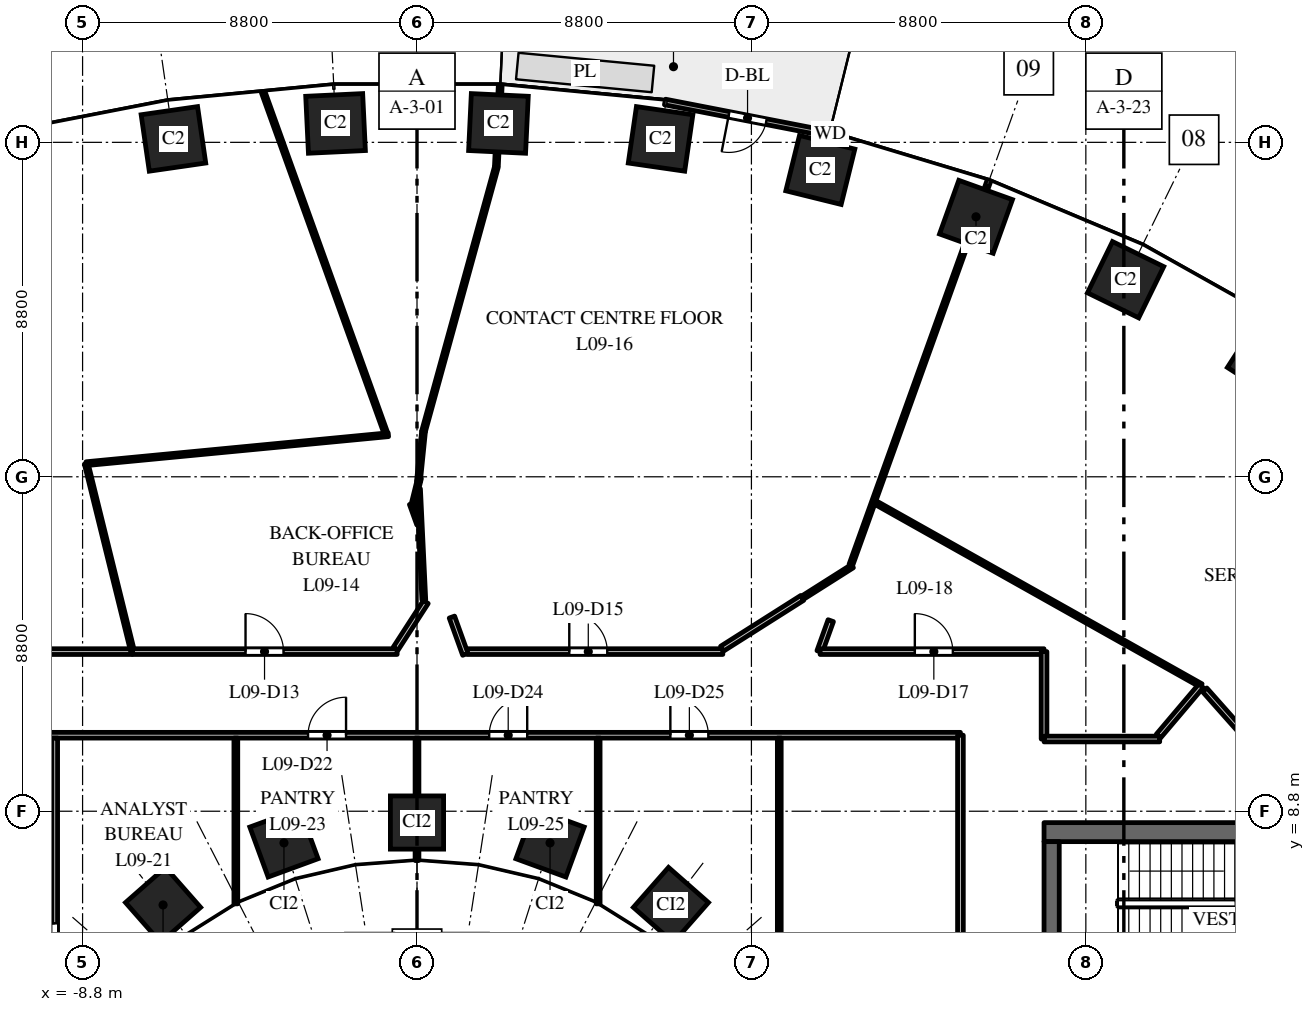
"""IFC4 building model, lengths in metres.
Left out: names, types, materials, properties, quantities, classifications, styles, units other than length and angle.
Written with IfcOpenShell. Run it as: python <this file> out.ifc"""

import sys

from ifc_helpers import new_model, si_unit, direction, frame, frame_2d, origin, origin_2d, place, context, subcontext, project, spatial, rectangle, extrude, element, fill, save


model = new_model("IFC4")
c1 = context("Model", 3, precision=1e-05, world=origin(), true_north=direction((0.0, 1.0)))
c2 = subcontext(c1, "Body", "Model", "MODEL_VIEW")
j1 = project(units=[si_unit("LENGTHUNIT", "METRE"), si_unit("PLANEANGLEUNIT", "RADIAN")], contexts=[c1])
p1 = place(None, origin())
s1 = spatial("IfcSite", under=j1, at=p1, CompositionType="ELEMENT")
p2 = place(p1, origin())
s2 = spatial("IfcBuilding", under=s1, at=p2, CompositionType="ELEMENT")
p3 = place(p2, frame((0.0, 0.0, 46.5)))
s3 = spatial("IfcBuildingStorey", under=s2, at=p3, CompositionType="ELEMENT", Elevation=46.5)
for number, where, z_axis, x_axis in (
    (1, (22.362, 20.7, 0.0), (0.0, 0.0, 1.0), (-0.84, 0.542, 0.0)),
    (2, (18.646, 22.785, 0.0), (0.0, 0.0, 1.0), (-0.898, 0.439, 0.0)),
    (3, (14.709, 24.441, 0.0), (0.0, 0.0, 1.0), (-0.941, 0.338, 0.0)),
    (4, (10.613, 25.674, 0.0), (0.0, 0.0, 1.0), (-0.971, 0.24, 0.0)),
    (5, (6.409, 26.491, 0.0), (0.0, 0.0, 1.0), (-0.99, 0.143, 0.0)),
    (6, (2.143, 26.898, 0.0), (0.0, 0.0, 1.0), (-0.999, 0.048, 0.0)),
    (7, (-2.143, 26.898, 0.0), (0.0, 0.0, 1.0), (-0.999, -0.048, 0.0)),
    (8, (-6.409, 26.491, 0.0), (0.0, 0.0, 1.0), (-0.99, -0.143, 0.0)),
):
    element("IfcColumn", number, at=place(p3, frame(where, z_axis=z_axis, x_axis=x_axis)), inside=s3, PredefinedType="COLUMN", context=c2, shape_type="SweptSolid", body=[
        extrude(rectangle(XDim=1.5, YDim=1.5, at=origin_2d()), origin(), (0.0, 0.0, 1.0), 4.0),
    ])
for number, where, z_axis, x_axis in (
    (9, (6.682, 6.334, 0.0), (0.0, 0.0, 1.0), (-0.751, 0.66, 0.0)),
    (10, (3.501, 7.967, 0.0), (0.0, 0.0, 1.0), (-0.939, 0.344, 0.0)),
    (11, (0.0, 8.503, 0.0), (0.0, 0.0, 1.0), (-1.0, 0.0, 0.0)),
    (12, (-3.501, 7.967, 0.0), (0.0, 0.0, 1.0), (-0.939, -0.344, 0.0)),
    (13, (-6.682, 6.334, 0.0), (0.0, 0.0, 1.0), (-0.751, -0.66, 0.0)),
):
    element("IfcColumn", number, at=place(p3, frame(where, z_axis=z_axis, x_axis=x_axis)), inside=s3, PredefinedType="COLUMN", context=c2, shape_type="SweptSolid", body=[
        extrude(rectangle(XDim=1.4, YDim=1.4, at=origin_2d()), origin(), (0.0, 0.0, 1.0), 4.0),
    ])
p4 = place(p3, frame((16.5, 8.25, 0.0), z_axis=(0.0, 0.0, 1.0), x_axis=(1.0, 0.0, 0.0)))
e14 = element("IfcWall", 14, at=p4, inside=s3, PredefinedType="SHEAR", context=c2, shape_type="SweptSolid", body=[
    extrude(rectangle(XDim=15.0, YDim=0.5, at=frame_2d((7.5, 0.0))), origin(), (0.0, 0.0, 1.0), 3.7),
])
p5 = place(p4, frame((6.9, 0.0, 0.0)))
e15 = element("IfcOpeningElement", 15, at=p5, cuts=e14, PredefinedType="OPENING", context=c2, shape_type="SweptSolid", body=[
    extrude(rectangle(XDim=1.2, YDim=2.1, at=frame_2d((0.6, 1.05))), frame((0.0, 0.26, 0.0), z_axis=(0.0, -1.0, 0.0), x_axis=(1.0, 0.0, 0.0)), (0.0, 0.0, 1.0), 0.52),
])
p6 = place(p4, frame((12.05, 0.0, 0.0)))
e16 = element("IfcOpeningElement", 16, at=p6, cuts=e14, PredefinedType="OPENING", context=c2, shape_type="SweptSolid", body=[
    extrude(rectangle(XDim=0.9, YDim=2.1, at=frame_2d((0.45, 1.05))), frame((0.0, 0.26, 0.0), z_axis=(0.0, -1.0, 0.0), x_axis=(1.0, 0.0, 0.0)), (0.0, 0.0, 1.0), 0.52),
])
p7 = place(p3, frame((16.7, -8.0, 0.0), z_axis=(0.0, 0.0, 1.0), x_axis=(0.0, 1.0, 0.0)))
e17 = element("IfcWall", 17, at=p7, inside=s3, PredefinedType="SHEAR", context=c2, shape_type="SweptSolid", body=[
    extrude(rectangle(XDim=16.0, YDim=0.4, at=frame_2d((8.0, 0.0))), origin(), (0.0, 0.0, 1.0), 3.7),
])
p8 = place(p3, frame((10.871, 26.617, 0.0), z_axis=(0.0, 0.0, 1.0), x_axis=(-0.981631174778, 0.190788460615, 0.0)))
e18 = element("IfcWall", 18, at=p8, inside=s3, PredefinedType="STANDARD", context=c2, shape_type="SweptSolid", body=[
    extrude(rectangle(XDim=4.426, YDim=0.15, at=frame_2d((2.213, 0.0))), origin(), (0.0, 0.0, 1.0), 3.7),
])
p9 = place(p8, frame((1.713, 0.0, 0.0)))
e19 = element("IfcOpeningElement", 19, at=p9, cuts=e18, PredefinedType="OPENING", context=c2, shape_type="SweptSolid", body=[
    extrude(rectangle(XDim=1.0, YDim=2.4, at=frame_2d((0.5, 1.2))), frame((0.0, 0.085, 0.0), z_axis=(0.0, -1.0, 0.0), x_axis=(1.0, 0.0, 0.0)), (0.0, 0.0, 1.0), 0.17),
])
p10 = place(p3, frame((-16.5, 13.0, 0.0), z_axis=(0.0, 0.0, 1.0), x_axis=(1.0, 0.0, 0.0)))
e20 = element("IfcWall", 20, at=p10, inside=s3, PredefinedType="PARTITIONING", context=c2, shape_type="SweptSolid", body=[
    extrude(rectangle(XDim=9.001, YDim=0.15, at=frame_2d((4.5, 0.0))), origin(), (0.0, 0.0, 1.0), 2.85),
])
p11 = place(p10, frame((4.117, 0.0, 0.0)))
e21 = element("IfcOpeningElement", 21, at=p11, cuts=e20, PredefinedType="OPENING", context=c2, shape_type="SweptSolid", body=[
    extrude(rectangle(XDim=1.0, YDim=2.1, at=frame_2d((0.5, 1.05))), frame((0.0, 0.085, 0.0), z_axis=(0.0, -1.0, 0.0), x_axis=(1.0, 0.0, 0.0)), (0.0, 0.0, 1.0), 0.17),
])
p12 = place(p3, frame((-14.3, 10.8, 0.0), z_axis=(0.0, 0.0, 1.0), x_axis=(1.0, 0.0, 0.0)))
e22 = element("IfcWall", 22, at=p12, inside=s3, PredefinedType="PARTITIONING", context=c2, shape_type="SweptSolid", body=[
    extrude(rectangle(XDim=28.6, YDim=0.15, at=frame_2d((14.3, 0.0))), origin(), (0.0, 0.0, 1.0), 2.85),
])
p13 = place(p12, frame((11.433, 0.0, 0.0)))
e23 = element("IfcOpeningElement", 23, at=p13, cuts=e22, PredefinedType="OPENING", context=c2, shape_type="SweptSolid", body=[
    extrude(rectangle(XDim=1.0, YDim=2.1, at=frame_2d((0.5, 1.05))), frame((0.0, 0.085, 0.0), z_axis=(0.0, -1.0, 0.0), x_axis=(1.0, 0.0, 0.0)), (0.0, 0.0, 1.0), 0.17),
])
p14 = place(p12, frame((16.2, 0.0, 0.0)))
e24 = element("IfcOpeningElement", 24, at=p14, cuts=e22, PredefinedType="OPENING", context=c2, shape_type="SweptSolid", body=[
    extrude(rectangle(XDim=1.0, YDim=2.1, at=frame_2d((0.5, 1.05))), frame((0.0, 0.085, 0.0), z_axis=(0.0, -1.0, 0.0), x_axis=(1.0, 0.0, 0.0)), (0.0, 0.0, 1.0), 0.17),
])
p15 = place(p12, frame((20.967, 0.0, 0.0)))
e25 = element("IfcOpeningElement", 25, at=p15, cuts=e22, PredefinedType="OPENING", context=c2, shape_type="SweptSolid", body=[
    extrude(rectangle(XDim=1.0, YDim=2.1, at=frame_2d((0.5, 1.05))), frame((0.0, 0.085, 0.0), z_axis=(0.0, -1.0, 0.0), x_axis=(1.0, 0.0, 0.0)), (0.0, 0.0, 1.0), 0.17),
])
p16 = place(p3, frame((-9.533, -10.725, 0.0), z_axis=(0.0, 0.0, 1.0), x_axis=(0.0, 1.0, 0.0)))
e26 = element("IfcWall", 26, at=p16, inside=s3, PredefinedType="PARTITIONING", context=c2, shape_type="SweptSolid", body=[
    extrude(rectangle(XDim=21.45, YDim=0.15, at=frame_2d((10.725, 0.0))), origin(), (0.0, 0.0, 1.0), 2.75),
])
p17 = place(p16, frame((15.575, 0.0, 0.0)))
e27 = element("IfcOpeningElement", 27, at=p17, cuts=e26, PredefinedType="OPENING", context=c2, shape_type="SweptSolid", body=[
    extrude(rectangle(XDim=1.0, YDim=2.1, at=frame_2d((0.5, 1.05))), frame((0.0, 0.085, 0.0), z_axis=(0.0, -1.0, 0.0), x_axis=(1.0, 0.0, 0.0)), (0.0, 0.0, 1.0), 0.17),
])
p18 = place(p3, frame((-8.704, 17.945, 0.0), z_axis=(0.0, 0.0, 1.0), x_axis=(0.995439666097, 0.095393244838, 0.0)))
e28 = element("IfcWall", 28, at=p18, inside=s3, PredefinedType="PARTITIONING", context=c2, shape_type="SweptSolid", body=[
    extrude(rectangle(XDim=7.988, YDim=0.1, at=frame_2d((3.994, 0.0))), origin(), (0.0, 0.0, 1.0), 2.85),
])
p19 = place(p3, frame((-8.704, 17.946, 0.0), z_axis=(0.0, 0.0, 1.0), x_axis=(0.239704393154, -0.970845921814, 0.0)))
e29 = element("IfcWall", 29, at=p19, inside=s3, PredefinedType="PARTITIONING", context=c2, shape_type="SweptSolid", body=[
    extrude(rectangle(XDim=5.094, YDim=0.1, at=frame_2d((2.547, 0.0))), origin(), (0.0, 0.0, 1.0), 3.7),
])
p20 = place(p3, frame((-7.483, 13.0, 0.0), z_axis=(0.0, 0.0, 1.0), x_axis=(1.0, 0.0, 0.0)))
e30 = element("IfcWall", 30, at=p20, inside=s3, PredefinedType="PARTITIONING", context=c2, shape_type="SweptSolid", body=[
    extrude(rectangle(XDim=6.96, YDim=0.15, at=frame_2d((3.48, 0.0))), origin(), (0.0, 0.0, 1.0), 2.85),
])
p21 = place(p20, frame((2.971, 0.0, 0.0)))
e31 = element("IfcOpeningElement", 31, at=p21, cuts=e30, PredefinedType="OPENING", context=c2, shape_type="SweptSolid", body=[
    extrude(rectangle(XDim=1.0, YDim=2.1, at=frame_2d((0.5, 1.05))), frame((0.0, 0.085, 0.0), z_axis=(0.0, -1.0, 0.0), x_axis=(1.0, 0.0, 0.0)), (0.0, 0.0, 1.0), 0.17),
])
p22 = place(p3, frame((-4.767, 6.363, 0.0), z_axis=(0.0, 0.0, 1.0), x_axis=(0.0, 1.0, 0.0)))
e32 = element("IfcWall", 32, at=p22, inside=s3, PredefinedType="PARTITIONING", context=c2, shape_type="SweptSolid", body=[
    extrude(rectangle(XDim=4.362, YDim=0.1, at=frame_2d((2.181, 0.0))), origin(), (0.0, 0.0, 1.0), 2.85),
])
p23 = place(p3, frame((-4.046, 27.717, 0.0), z_axis=(0.0, 0.0, 1.0), x_axis=(0.338447260677, -0.940985362129, 0.0)))
e33 = element("IfcWall", 33, at=p23, inside=s3, PredefinedType="PARTITIONING", context=c2, shape_type="SweptSolid", body=[
    extrude(rectangle(XDim=9.528, YDim=0.1, at=frame_2d((4.764, 0.0))), origin(), (0.0, 0.0, 1.0), 2.85),
])
p24 = place(p3, frame((-0.564, 13.075, 0.0), z_axis=(0.0, 0.0, 1.0), x_axis=(0.542961200627, 0.839757783301, 0.0)))
e34 = element("IfcWall", 34, at=p24, inside=s3, PredefinedType="PARTITIONING", context=c2, shape_type="SweptSolid", body=[
    extrude(rectangle(XDim=1.466, YDim=0.15, at=frame_2d((0.733, 0.0))), origin(), (0.0, 0.0, 1.0), 3.7),
])
p25 = place(p3, frame((-0.152, 16.888, 0.0), z_axis=(0.0, 0.0, 1.0), x_axis=(0.339185428329, -0.940719535892, 0.0)))
e35 = element("IfcWall", 35, at=p25, inside=s3, PredefinedType="PARTITIONING", context=c2, shape_type="SweptSolid", body=[
    extrude(rectangle(XDim=0.575, YDim=0.1, at=frame_2d((0.288, 0.0))), origin(), (0.0, 0.0, 1.0), 3.7),
])
p26 = place(p3, frame((-0.099, 16.892, 0.0), z_axis=(0.0, 0.0, 1.0), x_axis=(0.239223165208, 0.970964611728, 0.0)))
e36 = element("IfcWall", 36, at=p26, inside=s3, PredefinedType="PARTITIONING", context=c2, shape_type="SweptSolid", body=[
    extrude(rectangle(XDim=0.694, YDim=0.1, at=frame_2d((0.347, 0.0))), origin(), (0.0, 0.0, 1.0), 3.7),
])
p27 = place(p3, frame((0.0, 7.504, 0.0), z_axis=(0.0, 0.0, 1.0), x_axis=(0.0, 1.0, 0.0)))
e37 = element("IfcWall", 37, at=p27, inside=s3, PredefinedType="PARTITIONING", context=c2, shape_type="SweptSolid", body=[
    extrude(rectangle(XDim=3.221, YDim=0.1, at=frame_2d((1.611, 0.0))), origin(), (0.0, 0.0, 1.0), 3.7),
])
p28 = place(p3, frame((0.04, 17.284, 0.0), z_axis=(0.0, 0.0, 1.0), x_axis=(0.047505648741, -0.998870969314, 0.0)))
e38 = element("IfcWall", 38, at=p28, inside=s3, PredefinedType="PARTITIONING", context=c2, shape_type="SweptSolid", body=[
    extrude(rectangle(XDim=2.924, YDim=0.1, at=frame_2d((1.462, 0.0))), origin(), (0.0, 0.0, 1.0), 3.7),
])
p29 = place(p3, frame((0.038, 17.474, 0.0), z_axis=(0.0, 0.0, 1.0), x_axis=(0.100886401076, 0.99489795159, 0.0)))
e39 = element("IfcWall", 39, at=p29, inside=s3, PredefinedType="PARTITIONING", context=c2, shape_type="SweptSolid", body=[
    extrude(rectangle(XDim=1.329, YDim=0.1, at=frame_2d((0.664, 0.0))), origin(), (0.0, 0.0, 1.0), 3.7),
])
p30 = place(p3, frame((0.172, 18.796, 0.0), z_axis=(0.0, 0.0, 1.0), x_axis=(0.265628515821, 0.964075459486, 0.0)))
e40 = element("IfcWall", 40, at=p30, inside=s3, PredefinedType="PARTITIONING", context=c2, shape_type="SweptSolid", body=[
    extrude(rectangle(XDim=7.212, YDim=0.1, at=frame_2d((3.606, 0.0))), origin(), (0.0, 0.0, 1.0), 3.7),
])
p31 = place(p3, frame((0.919, 13.909, 0.0), z_axis=(0.0, 0.0, 1.0), x_axis=(0.338918653524, -0.94081568136, 0.0)))
e41 = element("IfcWall", 41, at=p31, inside=s3, PredefinedType="PARTITIONING", context=c2, shape_type="SweptSolid", body=[
    extrude(rectangle(XDim=1.042, YDim=0.15, at=frame_2d((0.521, 0.0))), origin(), (0.0, 0.0, 1.0), 3.7),
])
p32 = place(p3, frame((1.326, 13.0, 0.0), z_axis=(0.0, 0.0, 1.0), x_axis=(1.0, 0.0, 0.0)))
e42 = element("IfcWall", 42, at=p32, inside=s3, PredefinedType="PARTITIONING", context=c2, shape_type="SweptSolid", body=[
    extrude(rectangle(XDim=6.721, YDim=0.15, at=frame_2d((3.361, 0.0))), origin(), (0.0, 0.0, 1.0), 2.85),
])
p33 = place(p32, frame((2.681, 0.0, 0.0)))
e43 = element("IfcOpeningElement", 43, at=p33, cuts=e42, PredefinedType="OPENING", context=c2, shape_type="SweptSolid", body=[
    extrude(rectangle(XDim=1.0, YDim=2.1, at=frame_2d((0.5, 1.05))), frame((0.0, 0.085, 0.0), z_axis=(0.0, -1.0, 0.0), x_axis=(1.0, 0.0, 0.0)), (0.0, 0.0, 1.0), 0.17),
])
p34 = place(p3, frame((2.089, 25.77, 0.0), z_axis=(0.0, 0.0, 1.0), x_axis=(0.04733101585, 0.99887925944, 0.0)))
e44 = element("IfcWall", 44, at=p34, inside=s3, PredefinedType="PARTITIONING", context=c2, shape_type="SweptSolid", body=[
    extrude(rectangle(XDim=2.13, YDim=0.1, at=frame_2d((1.065, 0.0))), origin(), (0.0, 0.0, 1.0), 2.85),
])
p35 = place(p3, frame((4.767, 6.363, 0.0), z_axis=(0.0, 0.0, 1.0), x_axis=(0.0, 1.0, 0.0)))
e45 = element("IfcWall", 45, at=p35, inside=s3, PredefinedType="PARTITIONING", context=c2, shape_type="SweptSolid", body=[
    extrude(rectangle(XDim=4.362, YDim=0.1, at=frame_2d((2.181, 0.0))), origin(), (0.0, 0.0, 1.0), 2.85),
])
p36 = place(p3, frame((8.028, 13.077, 0.0), z_axis=(0.0, 0.0, 1.0), x_axis=(0.844718865656, 0.53521027457, 0.0)))
e46 = element("IfcWall", 46, at=p36, inside=s3, PredefinedType="PARTITIONING", context=c2, shape_type="SweptSolid", body=[
    extrude(rectangle(XDim=2.497, YDim=0.15, at=frame_2d((1.248, 0.0))), origin(), (0.0, 0.0, 1.0), 3.7),
])
p37 = place(p3, frame((9.533, -10.725, 0.0), z_axis=(0.0, 0.0, 1.0), x_axis=(0.0, 1.0, 0.0)))
e47 = element("IfcWall", 47, at=p37, inside=s3, PredefinedType="PARTITIONING", context=c2, shape_type="SweptSolid", body=[
    extrude(rectangle(XDim=21.45, YDim=0.1, at=frame_2d((10.725, 0.0))), origin(), (0.0, 0.0, 1.0), 2.75),
])
p38 = place(p3, frame((10.137, 14.413, 0.0), z_axis=(0.0, 0.0, 1.0), x_axis=(0.844849680057, 0.535003755228, 0.0)))
e48 = element("IfcWall", 48, at=p38, inside=s3, PredefinedType="PARTITIONING", context=c2, shape_type="SweptSolid", body=[
    extrude(rectangle(XDim=1.562, YDim=0.1, at=frame_2d((0.781, 0.0))), origin(), (0.0, 0.0, 1.0), 3.7),
])
p39 = place(p3, frame((10.595, 13.0, 0.0), z_axis=(0.0, 0.0, 1.0), x_axis=(0.338659506624, 0.940908995904, 0.0)))
e49 = element("IfcWall", 49, at=p39, inside=s3, PredefinedType="PARTITIONING", context=c2, shape_type="SweptSolid", body=[
    extrude(rectangle(XDim=0.865, YDim=0.15, at=frame_2d((0.433, 0.0))), origin(), (0.0, 0.0, 1.0), 3.7),
])
p40 = place(p3, frame((10.607, 13.0, 0.0), z_axis=(0.0, 0.0, 1.0), x_axis=(1.0, 0.0, 0.0)))
e50 = element("IfcWall", 50, at=p40, inside=s3, PredefinedType="PARTITIONING", context=c2, shape_type="SweptSolid", body=[
    extrude(rectangle(XDim=5.893, YDim=0.15, at=frame_2d((2.947, 0.0))), origin(), (0.0, 0.0, 1.0), 3.7),
])
p41 = place(p40, frame((2.493, 0.0, 0.0)))
e51 = element("IfcOpeningElement", 51, at=p41, cuts=e50, PredefinedType="OPENING", context=c2, shape_type="SweptSolid", body=[
    extrude(rectangle(XDim=1.0, YDim=2.1, at=frame_2d((0.5, 1.05))), frame((0.0, 0.085, 0.0), z_axis=(0.0, -1.0, 0.0), x_axis=(1.0, 0.0, 0.0)), (0.0, 0.0, 1.0), 0.17),
])
p42 = place(p3, frame((11.417, 15.282, 0.0), z_axis=(0.0, 0.0, 1.0), x_axis=(0.338283704349, 0.941044172912, 0.0)))
e52 = element("IfcWall", 52, at=p42, inside=s3, PredefinedType="PARTITIONING", context=c2, shape_type="SweptSolid", body=[
    extrude(rectangle(XDim=10.734, YDim=0.1, at=frame_2d((5.367, 0.0))), origin(), (0.0, 0.0, 1.0), 3.7),
])
p43 = place(p3, frame((12.06, 16.924, 0.0), z_axis=(0.0, 0.0, 1.0), x_axis=(0.871847863021, -0.489776789718, 0.0)))
e53 = element("IfcWall", 53, at=p43, inside=s3, PredefinedType="PARTITIONING", context=c2, shape_type="SweptSolid", body=[
    extrude(rectangle(XDim=9.835, YDim=0.1, at=frame_2d((4.918, 0.0))), origin(), (0.0, 0.0, 1.0), 3.7),
])
p44 = place(p3, frame((14.3, -10.8, 0.0), z_axis=(0.0, 0.0, 1.0), x_axis=(0.0, 1.0, 0.0)))
e54 = element("IfcWall", 54, at=p44, inside=s3, PredefinedType="PARTITIONING", context=c2, shape_type="SweptSolid", body=[
    extrude(rectangle(XDim=21.6, YDim=0.15, at=frame_2d((10.8, 0.0))), origin(), (0.0, 0.0, 1.0), 2.75),
])
p45 = place(p44, frame((10.2, 0.0, 0.0)))
e55 = element("IfcOpeningElement", 55, at=p45, cuts=e54, PredefinedType="OPENING", context=c2, shape_type="SweptSolid", body=[
    extrude(rectangle(XDim=1.0, YDim=2.1, at=frame_2d((0.5, 1.05))), frame((0.0, 0.085, 0.0), z_axis=(0.0, -1.0, 0.0), x_axis=(1.0, 0.0, 0.0)), (0.0, 0.0, 1.0), 0.17),
])
p46 = place(p3, frame((16.5, 10.7, 0.0), z_axis=(0.0, 0.0, 1.0), x_axis=(0.0, 1.0, 0.0)))
e56 = element("IfcWall", 56, at=p46, inside=s3, PredefinedType="PARTITIONING", context=c2, shape_type="SweptSolid", body=[
    extrude(rectangle(XDim=2.3, YDim=0.15, at=frame_2d((1.15, 0.0))), origin(), (0.0, 0.0, 1.0), 3.7),
])
p47 = place(p3, frame((16.5, 10.7, 0.0), z_axis=(0.0, 0.0, 1.0), x_axis=(1.0, 0.0, 0.0)))
e57 = element("IfcWall", 57, at=p47, inside=s3, PredefinedType="PARTITIONING", context=c2, shape_type="SweptSolid", body=[
    extrude(rectangle(XDim=3.043, YDim=0.15, at=frame_2d((1.521, 0.0))), origin(), (0.0, 0.0, 1.0), 3.7),
])
p48 = place(p3, frame((19.511, 10.778, 0.0), z_axis=(0.0, 0.0, 1.0), x_axis=(0.646491141339, 0.762921492796, 0.0)))
e58 = element("IfcWall", 58, at=p48, inside=s3, PredefinedType="PARTITIONING", context=c2, shape_type="SweptSolid", body=[
    extrude(rectangle(XDim=1.734, YDim=0.15, at=frame_2d((0.867, 0.0))), origin(), (0.0, 0.0, 1.0), 3.7),
])
p49 = place(p3, frame((20.727, 11.994, 0.0), z_axis=(0.0, 0.0, 1.0), x_axis=(0.663767495264, -0.747938976275, 0.0)))
e59 = element("IfcWall", 59, at=p49, inside=s3, PredefinedType="PARTITIONING", context=c2, shape_type="SweptSolid", body=[
    extrude(rectangle(XDim=1.83, YDim=0.15, at=frame_2d((0.915, 0.0))), origin(), (0.0, 0.0, 1.0), 2.75),
])
p50 = place(p9, origin())
e60 = element("IfcDoor", 60, at=p50, inside=s3, OperationType="SINGLE_SWING_RIGHT", PredefinedType="DOOR", context=c2, shape_type="SweptSolid", body=[
    extrude(rectangle(XDim=1.0, YDim=2.4, at=frame_2d((0.5, 1.2))), frame((0.0, 0.025, 0.0), z_axis=(0.0, -1.0, 0.0), x_axis=(1.0, 0.0, 0.0)), (0.0, 0.0, 1.0), 0.05),
])
fill(e19, e60)
p51 = place(p21, origin())
e61 = element("IfcDoor", 61, at=p51, inside=s3, OperationType="SINGLE_SWING_LEFT", PredefinedType="DOOR", context=c2, shape_type="SweptSolid", body=[
    extrude(rectangle(XDim=1.0, YDim=2.1, at=frame_2d((0.5, 1.05))), frame((0.0, 0.025, 0.0), z_axis=(0.0, -1.0, 0.0), x_axis=(1.0, 0.0, 0.0)), (0.0, 0.0, 1.0), 0.05),
])
fill(e31, e61)
p52 = place(p33, origin())
e62 = element("IfcDoor", 62, at=p52, inside=s3, OperationType="SINGLE_SWING_LEFT", PredefinedType="DOOR", context=c2, shape_type="SweptSolid", body=[
    extrude(rectangle(XDim=1.0, YDim=2.1, at=frame_2d((0.5, 1.05))), frame((0.0, 0.025, 0.0), z_axis=(0.0, -1.0, 0.0), x_axis=(1.0, 0.0, 0.0)), (0.0, 0.0, 1.0), 0.05),
])
fill(e43, e62)
p53 = place(p41, origin())
e63 = element("IfcDoor", 63, at=p53, inside=s3, OperationType="SINGLE_SWING_LEFT", PredefinedType="DOOR", context=c2, shape_type="SweptSolid", body=[
    extrude(rectangle(XDim=1.0, YDim=2.1, at=frame_2d((0.5, 1.05))), frame((0.0, 0.025, 0.0), z_axis=(0.0, -1.0, 0.0), x_axis=(1.0, 0.0, 0.0)), (0.0, 0.0, 1.0), 0.05),
])
fill(e51, e63)
p54 = place(p17, origin())
e64 = element("IfcDoor", 64, at=p54, inside=s3, OperationType="SINGLE_SWING_RIGHT", PredefinedType="DOOR", context=c2, shape_type="SweptSolid", body=[
    extrude(rectangle(XDim=1.0, YDim=2.1, at=frame_2d((0.5, 1.05))), frame((0.0, 0.025, 0.0), z_axis=(0.0, -1.0, 0.0), x_axis=(1.0, 0.0, 0.0)), (0.0, 0.0, 1.0), 0.05),
])
fill(e27, e64)
p55 = place(p13, origin())
e65 = element("IfcDoor", 65, at=p55, inside=s3, OperationType="SINGLE_SWING_RIGHT", PredefinedType="DOOR", context=c2, shape_type="SweptSolid", body=[
    extrude(rectangle(XDim=1.0, YDim=2.1, at=frame_2d((0.5, 1.05))), frame((0.0, 0.025, 0.0), z_axis=(0.0, -1.0, 0.0), x_axis=(1.0, 0.0, 0.0)), (0.0, 0.0, 1.0), 0.05),
])
fill(e23, e65)
p56 = place(p14, origin())
e66 = element("IfcDoor", 66, at=p56, inside=s3, OperationType="SINGLE_SWING_RIGHT", PredefinedType="DOOR", context=c2, shape_type="SweptSolid", body=[
    extrude(rectangle(XDim=1.0, YDim=2.1, at=frame_2d((0.5, 1.05))), frame((0.0, 0.025, 0.0), z_axis=(0.0, -1.0, 0.0), x_axis=(1.0, 0.0, 0.0)), (0.0, 0.0, 1.0), 0.05),
])
fill(e24, e66)
p57 = place(p15, origin())
e67 = element("IfcDoor", 67, at=p57, inside=s3, OperationType="SINGLE_SWING_LEFT", PredefinedType="DOOR", context=c2, shape_type="SweptSolid", body=[
    extrude(rectangle(XDim=1.0, YDim=2.1, at=frame_2d((0.5, 1.05))), frame((0.0, 0.025, 0.0), z_axis=(0.0, -1.0, 0.0), x_axis=(1.0, 0.0, 0.0)), (0.0, 0.0, 1.0), 0.05),
])
fill(e25, e67)
save(model, sys.argv[1])
